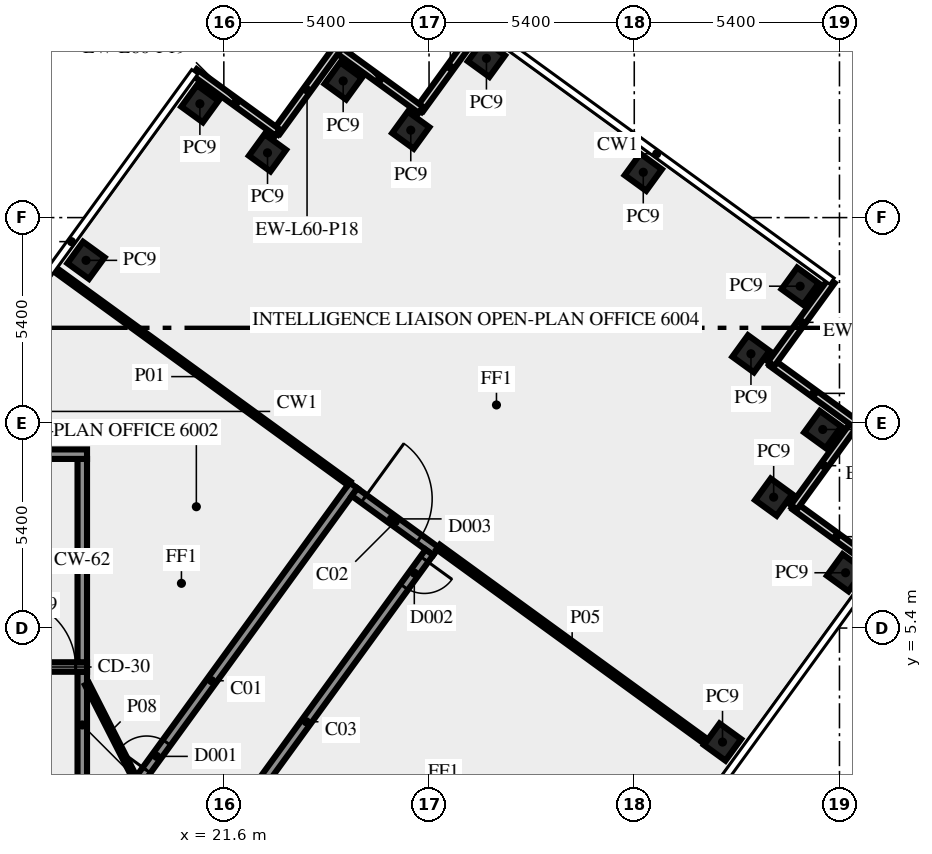
"""IFC4 building model, lengths in metres.
Left out: names, types, materials, properties, quantities, classifications, styles, units other than length and angle.
Written with IfcOpenShell. Run it as: python <this file> out.ifc"""

import sys

from ifc_helpers import new_model, si_unit, direction, frame, frame_2d, origin, origin_2d, place, context, subcontext, project, spatial, rectangle, extrude, element, fill, save


model = new_model("IFC4")
c1 = context("Model", 3, precision=1e-05, world=origin(), true_north=direction((0.0, 1.0)))
c2 = subcontext(c1, "Body", "Model", "MODEL_VIEW")
j1 = project(units=[si_unit("LENGTHUNIT", "METRE"), si_unit("PLANEANGLEUNIT", "RADIAN")], contexts=[c1])
p1 = place(None, origin())
s1 = spatial("IfcSite", under=j1, at=p1, CompositionType="ELEMENT")
p2 = place(p1, origin())
s2 = spatial("IfcBuilding", under=s1, at=p2, CompositionType="ELEMENT")
p3 = place(p2, frame((0.0, 0.0, 257.0)))
s3 = spatial("IfcBuildingStorey", under=s2, at=p3, CompositionType="ELEMENT", Elevation=257.0)
for number, where, z_axis, x_axis in (
    (1, (34.722, 2.4, 0.0), (0.0, 0.0, 1.0), (0.588, 0.809, 0.0)),
    (2, (37.96, 6.855, 0.0), (0.0, 0.0, 1.0), (0.588, 0.809, 0.0)),
    (3, (36.068, 8.844, 0.0), (0.0, 0.0, 1.0), (0.588, 0.809, 0.0)),
    (4, (37.36, 10.625, 0.0), (0.0, 0.0, 1.0), (0.588, 0.809, 0.0)),
    (5, (35.471, 12.616, 0.0), (0.0, 0.0, 1.0), (-0.809, 0.588, 0.0)),
    (6, (36.765, 14.395, 0.0), (0.0, 0.0, 1.0), (-0.809, 0.588, 0.0)),
    (7, (32.637, 17.393, 0.0), (0.0, 0.0, 1.0), (-0.809, 0.588, 0.0)),
    (8, (28.51, 20.39, 0.0), (0.0, 0.0, 1.0), (-0.588, -0.809, 0.0)),
    (9, (26.519, 18.5, 0.0), (0.0, 0.0, 1.0), (-0.809, 0.588, 0.0)),
    (10, (24.74, 19.795, 0.0), (0.0, 0.0, 1.0), (-0.588, -0.809, 0.0)),
    (11, (22.749, 17.904, 0.0), (0.0, 0.0, 1.0), (-0.588, -0.809, 0.0)),
    (12, (20.97, 19.195, 0.0), (0.0, 0.0, 1.0), (-0.588, -0.809, 0.0)),
    (13, (17.974, 15.075, 0.0), (0.0, 0.0, 1.0), (-0.588, -0.809, 0.0)),
):
    element("IfcColumn", number, at=place(p3, frame(where, z_axis=z_axis, x_axis=x_axis)), inside=s3, PredefinedType="COLUMN", context=c2, shape_type="SweptSolid", body=[
        extrude(rectangle(XDim=0.7, YDim=0.7, at=origin_2d()), origin(), (0.0, 0.0, 1.0), 3.65),
    ])
for number, where, z_axis, x_axis in (
    (14, (38.814, 7.01, 0.0), (0.0, 0.0, 1.0), (-0.809, 0.588, 0.0)),
    (15, (36.602, 8.58, 0.0), (0.0, 0.0, 1.0), (0.588, 0.809, 0.0)),
    (16, (38.216, 10.782, 0.0), (0.0, 0.0, 1.0), (-0.809, 0.588, 0.0)),
    (17, (36.005, 12.352, 0.0), (0.0, 0.0, 1.0), (0.588, 0.809, 0.0)),
):
    element("IfcWall", number, at=place(p3, frame(where, z_axis=z_axis, x_axis=x_axis)), inside=s3, PredefinedType="SOLIDWALL", context=c2, shape_type="SweptSolid", body=[
        extrude(rectangle(XDim=2.7, YDim=0.2, at=frame_2d((1.35, 0.0))), origin(), (0.0, 0.0, 1.0), 3.65),
    ])
for number, where, z_axis, x_axis in (
    (18, (28.354, 21.247, 0.0), (0.0, 0.0, 1.0), (-0.588, -0.809, 0.0)),
    (19, (26.785, 19.036, 0.0), (0.0, 0.0, 1.0), (-0.809, 0.588, 0.0)),
):
    element("IfcWall", number, at=place(p3, frame(where, z_axis=z_axis, x_axis=x_axis)), inside=s3, PredefinedType="SOLIDWALL", context=c2, shape_type="SweptSolid", body=[
        extrude(rectangle(XDim=2.7, YDim=0.2, at=frame_2d((1.35, 0.0))), origin(), (0.0, 0.0, 1.0), 3.65),
    ])
for number, where, z_axis, x_axis in (
    (20, (24.583, 20.65, 0.0), (0.0, 0.0, 1.0), (-0.588, -0.809, 0.0)),
    (21, (23.013, 18.438, 0.0), (0.0, 0.0, 1.0), (-0.809, 0.588, 0.0)),
):
    element("IfcWall", number, at=place(p3, frame(where, z_axis=z_axis, x_axis=x_axis)), inside=s3, PredefinedType="SOLIDWALL", context=c2, shape_type="SweptSolid", body=[
        extrude(rectangle(XDim=2.7, YDim=0.2, at=frame_2d((1.35, 0.0))), origin(), (0.0, 0.0, 1.0), 3.65),
    ])
p4 = place(p3, frame((17.875, 1.45, 0.0), z_axis=(0.0, 0.0, 1.0), x_axis=(0.0, 1.0, 0.0)))
e22 = element("IfcWall", 22, at=p4, inside=s3, PredefinedType="SHEAR", context=c2, shape_type="SweptSolid", body=[
    extrude(rectangle(XDim=2.8, YDim=0.25, at=frame_2d((1.4, 0.0))), origin(), (0.0, 0.0, 1.0), 3.65),
])
p5 = place(p3, frame((7.5, 4.375, 0.0), z_axis=(0.0, 0.0, 1.0), x_axis=(1.0, 0.0, 0.0)))
e23 = element("IfcWall", 23, at=p5, inside=s3, PredefinedType="SHEAR", context=c2, shape_type="SweptSolid", body=[
    extrude(rectangle(XDim=10.5, YDim=0.25, at=frame_2d((5.25, 0.0))), origin(), (0.0, 0.0, 1.0), 3.65),
])
p6 = place(p5, frame((8.4, 0.0, 0.0)))
e24 = element("IfcOpeningElement", 24, at=p6, cuts=e23, PredefinedType="OPENING", context=c2, shape_type="SweptSolid", body=[
    extrude(rectangle(XDim=1.8, YDim=2.1, at=frame_2d((0.9, 1.05))), frame((0.0, 0.135, 0.0), z_axis=(0.0, -1.0, 0.0), x_axis=(1.0, 0.0, 0.0)), (0.0, 0.0, 1.0), 0.27),
])
p7 = place(p3, frame((17.875, 4.5, 0.0), z_axis=(0.0, 0.0, 1.0), x_axis=(0.0, 1.0, 0.0)))
e25 = element("IfcWall", 25, at=p7, inside=s3, PredefinedType="SHEAR", context=c2, shape_type="SweptSolid", body=[
    extrude(rectangle(XDim=5.35, YDim=0.25, at=frame_2d((2.675, 0.0))), origin(), (0.0, 0.0, 1.0), 3.65),
])
p8 = place(p3, frame((7.5, 9.975, 0.0), z_axis=(0.0, 0.0, 1.0), x_axis=(1.0, 0.0, 0.0)))
e26 = element("IfcWall", 26, at=p8, inside=s3, PredefinedType="SHEAR", context=c2, shape_type="SweptSolid", body=[
    extrude(rectangle(XDim=10.5, YDim=0.25, at=frame_2d((5.25, 0.0))), origin(), (0.0, 0.0, 1.0), 3.65),
])
p9 = place(p8, frame((2.0, 0.0, 1.0)))
e27 = element("IfcOpeningElement", 27, at=p9, cuts=e26, PredefinedType="OPENING", context=c2, shape_type="SweptSolid", body=[
    extrude(rectangle(XDim=1.2, YDim=1.2, at=frame_2d((0.6, 0.6))), frame((0.0, 0.135, 0.0), z_axis=(0.0, -1.0, 0.0), x_axis=(1.0, 0.0, 0.0)), (0.0, 0.0, 1.0), 0.27),
])
p10 = place(p3, frame((17.545, -1.125, 0.0), z_axis=(0.0, 0.0, 1.0), x_axis=(0.587796810203, 0.809008596935, 0.0)))
e28 = element("IfcWall", 28, at=p10, inside=s3, PredefinedType="SOLIDWALL", context=c2, shape_type="SweptSolid", body=[
    extrude(rectangle(XDim=12.703, YDim=0.25, at=frame_2d((6.352, 0.0))), origin(), (0.0, 0.0, 1.0), 3.65),
])
p11 = place(p10, frame((3.441, 0.0, 0.0)))
e29 = element("IfcOpeningElement", 29, at=p11, cuts=e28, PredefinedType="OPENING", context=c2, shape_type="SweptSolid", body=[
    extrude(rectangle(XDim=0.9, YDim=2.1, at=frame_2d((0.45, 1.05))), frame((0.0, 0.135, 0.0), z_axis=(0.0, -1.0, 0.0), x_axis=(1.0, 0.0, 0.0)), (0.0, 0.0, 1.0), 0.27),
])
p12 = place(p3, frame((25.039, 8.978, 0.0), z_axis=(0.0, 0.0, 1.0), x_axis=(0.809006914995, -0.587799125119, 0.0)))
e30 = element("IfcWall", 30, at=p12, inside=s3, PredefinedType="SOLIDWALL", context=c2, shape_type="SweptSolid", body=[
    extrude(rectangle(XDim=2.65, YDim=0.25, at=frame_2d((1.325, 0.0))), origin(), (0.0, 0.0, 1.0), 3.65),
])
p13 = place(p12, frame((0.301, 0.0, 0.0)))
e31 = element("IfcOpeningElement", 31, at=p13, cuts=e30, PredefinedType="OPENING", context=c2, shape_type="SweptSolid", body=[
    extrude(rectangle(XDim=1.8, YDim=2.1, at=frame_2d((0.9, 1.05))), frame((0.0, 0.135, 0.0), z_axis=(0.0, -1.0, 0.0), x_axis=(1.0, 0.0, 0.0)), (0.0, 0.0, 1.0), 0.27),
])
p14 = place(p3, frame((27.009, 7.392, 0.0), z_axis=(0.0, 0.0, 1.0), x_axis=(-0.587776457057, -0.809023384414, 0.0)))
e32 = element("IfcWall", 32, at=p14, inside=s3, PredefinedType="SOLIDWALL", context=c2, shape_type="SweptSolid", body=[
    extrude(rectangle(XDim=11.021, YDim=0.25, at=frame_2d((5.51, 0.0))), origin(), (0.0, 0.0, 1.0), 3.65),
])
p15 = place(p14, frame((0.225, 0.0, 0.0)))
e33 = element("IfcOpeningElement", 33, at=p15, cuts=e32, PredefinedType="OPENING", context=c2, shape_type="SweptSolid", body=[
    extrude(rectangle(XDim=0.9, YDim=2.1, at=frame_2d((0.45, 1.05))), frame((0.0, 0.135, 0.0), z_axis=(0.0, -1.0, 0.0), x_axis=(1.0, 0.0, 0.0)), (0.0, 0.0, 1.0), 0.27),
])
p16 = place(p3, frame((24.898, 9.209, 0.0), z_axis=(0.0, 0.0, 1.0), x_axis=(-0.809013490065, 0.587790075531, 0.0)))
e34 = element("IfcWall", 34, at=p16, inside=s3, PredefinedType="PARTITIONING", context=c2, shape_type="SweptSolid", body=[
    extrude(rectangle(XDim=9.549, YDim=0.12, at=frame_2d((4.775, 0.0))), origin(), (0.0, 0.0, 1.0), 2.95),
])
p17 = place(p3, frame((27.24, 7.532, 0.0), z_axis=(0.0, 0.0, 1.0), x_axis=(0.809027940177, -0.587770186393, 0.0)))
e35 = element("IfcWall", 35, at=p17, inside=s3, PredefinedType="PARTITIONING", context=c2, shape_type="SweptSolid", body=[
    extrude(rectangle(XDim=8.715, YDim=0.15, at=frame_2d((4.357, 0.0))), origin(), (0.0, 0.0, 1.0), 3.65),
])
p18 = place(p3, frame((18.0, 3.925, 0.0), z_axis=(0.0, 0.0, 1.0), x_axis=(0.453950796792, -0.891026752736, 0.0)))
e36 = element("IfcWall", 36, at=p18, inside=s3, PredefinedType="PARTITIONING", context=c2, shape_type="SweptSolid", body=[
    extrude(rectangle(XDim=2.778, YDim=0.12, at=frame_2d((1.389, 0.0))), origin(), (0.0, 0.0, 1.0), 3.65),
])
p19 = place(p6, origin())
e37 = element("IfcDoor", 37, at=p19, inside=s3, OperationType="DOUBLE_DOOR_SINGLE_SWING", PredefinedType="DOOR", context=c2, shape_type="SweptSolid", body=[
    extrude(rectangle(XDim=1.8, YDim=2.1, at=frame_2d((0.9, 1.05))), frame((0.0, 0.025, 0.0), z_axis=(0.0, -1.0, 0.0), x_axis=(1.0, 0.0, 0.0)), (0.0, 0.0, 1.0), 0.05),
])
fill(e24, e37)
p20 = place(p11, origin())
e38 = element("IfcDoor", 38, at=p20, inside=s3, OperationType="SINGLE_SWING_LEFT", PredefinedType="DOOR", context=c2, shape_type="SweptSolid", body=[
    extrude(rectangle(XDim=0.9, YDim=2.1, at=frame_2d((0.45, 1.05))), frame((0.0, 0.025, 0.0), z_axis=(0.0, -1.0, 0.0), x_axis=(1.0, 0.0, 0.0)), (0.0, 0.0, 1.0), 0.05),
])
fill(e29, e38)
p21 = place(p13, origin())
e39 = element("IfcDoor", 39, at=p21, inside=s3, OperationType="DOUBLE_DOOR_SINGLE_SWING", PredefinedType="DOOR", context=c2, shape_type="SweptSolid", body=[
    extrude(rectangle(XDim=1.8, YDim=2.1, at=frame_2d((0.9, 1.05))), frame((0.0, 0.025, 0.0), z_axis=(0.0, -1.0, 0.0), x_axis=(1.0, 0.0, 0.0)), (0.0, 0.0, 1.0), 0.05),
])
fill(e31, e39)
p22 = place(p15, origin())
e40 = element("IfcDoor", 40, at=p22, inside=s3, OperationType="SINGLE_SWING_LEFT", PredefinedType="DOOR", context=c2, shape_type="SweptSolid", body=[
    extrude(rectangle(XDim=0.9, YDim=2.1, at=frame_2d((0.45, 1.05))), frame((0.0, 0.025, 0.0), z_axis=(0.0, -1.0, 0.0), x_axis=(1.0, 0.0, 0.0)), (0.0, 0.0, 1.0), 0.05),
])
fill(e33, e40)
save(model, sys.argv[1])
